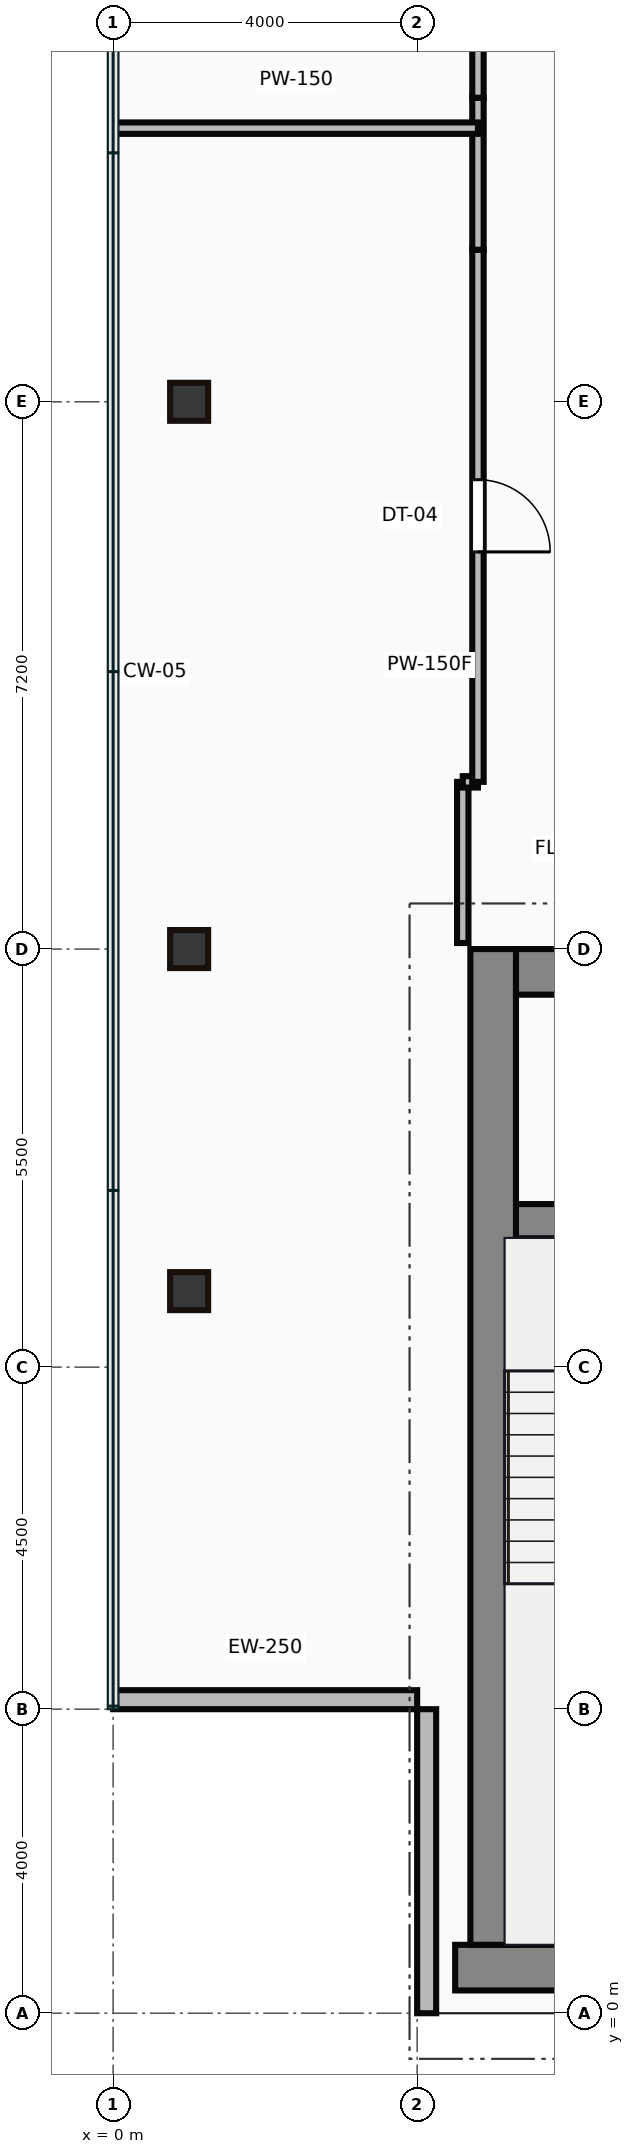
"""IFC4 building model, lengths in metres.
Left out: names, types, materials, properties, quantities, classifications, styles, units other than length and angle.
Written with IfcOpenShell. Run it as: python <this file> out.ifc"""

import sys

from ifc_helpers import new_model, si_unit, direction, frame, frame_2d, origin, origin_2d, place, context, subcontext, project, spatial, rectangle, hollow_rectangle, extrude, source, transform, mapped, element, fill, save


model = new_model("IFC4")
c1 = context("Model", 3, precision=1e-05, world=origin(), true_north=direction((0.0, 1.0)))
c2 = subcontext(c1, "Body", "Model", "MODEL_VIEW")
j1 = project(units=[si_unit("LENGTHUNIT", "METRE"), si_unit("PLANEANGLEUNIT", "RADIAN")], contexts=[c1])
p1 = place(None, origin())
s1 = spatial("IfcSite", under=j1, at=p1, CompositionType="ELEMENT")
p2 = place(p1, origin())
s2 = spatial("IfcBuilding", under=s1, at=p2, CompositionType="ELEMENT")
p3 = place(p2, frame((0.0, 0.0, 251.5)))
s3 = spatial("IfcBuildingStorey", under=s2, at=p3, CompositionType="ELEMENT", Elevation=251.5)
m1 = source(origin(), c2, "Body", "SweptSolid", [
    extrude(rectangle(XDim=29.5, YDim=0.6, at=frame_2d((14.75, 0.0))), origin(), (0.0, 0.0, 1.0), 3.65),
])
p4 = place(p3, frame((4.5, 0.6, 0.0), z_axis=(0.0, 0.0, 1.0), x_axis=(1.0, 0.0, 0.0)))
e1 = element("IfcWall", 1, at=p4, inside=s3, PredefinedType="SHEAR", context=c2, shape_type="MappedRepresentation", body=[
    mapped(m1, transform((0.0, 0.0, 0.0))),
])
m2 = source(origin(), c2, "Body", "SweptSolid", [
    extrude(rectangle(XDim=13.1, YDim=0.6, at=frame_2d((6.55, 0.0))), origin(), (0.0, 0.0, 1.0), 3.65),
])
p5 = place(p3, frame((5.0, 0.9, 0.0), z_axis=(0.0, 0.0, 1.0), x_axis=(0.0, 1.0, 0.0)))
e2 = element("IfcWall", 2, at=p5, inside=s3, PredefinedType="SHEAR", context=c2, shape_type="MappedRepresentation", body=[
    mapped(m2, transform((0.0, 0.0, 0.0))),
])
m3 = source(origin(), c2, "Body", "SweptSolid", [
    extrude(rectangle(XDim=9.1, YDim=0.6, at=frame_2d((4.55, 0.0))), origin(), (0.0, 0.0, 1.0), 3.65),
])
p6 = place(p3, frame((5.3, 13.7, 0.0), z_axis=(0.0, 0.0, 1.0), x_axis=(1.0, 0.0, 0.0)))
e3 = element("IfcWall", 3, at=p6, inside=s3, PredefinedType="SHEAR", context=c2, shape_type="MappedRepresentation", body=[
    mapped(m3, transform((0.0, 0.0, 0.0))),
])
p7 = place(p6, frame((4.1, 0.0, 0.0)))
e4 = element("IfcOpeningElement", 4, at=p7, cuts=e3, PredefinedType="OPENING", context=c2, shape_type="SweptSolid", body=[
    extrude(rectangle(XDim=1.1, YDim=2.15, at=frame_2d((0.55, 1.075))), frame((0.0, 0.31, 0.0), z_axis=(0.0, -1.0, 0.0), x_axis=(1.0, 0.0, 0.0)), (0.0, 0.0, 1.0), 0.62),
])
m4 = source(origin(), c2, "Body", "SweptSolid", [
    extrude(rectangle(XDim=3.39, YDim=0.45, at=frame_2d((1.695, 0.0))), origin(), (0.0, 0.0, 1.0), 3.65),
])
p8 = place(p3, frame((5.25, 10.42, 0.0), z_axis=(0.0, 0.0, 1.0), x_axis=(1.0, 0.0, 0.0)))
e5 = element("IfcWall", 5, at=p8, inside=s3, PredefinedType="SHEAR", context=c2, shape_type="MappedRepresentation", body=[
    mapped(m4, transform((0.0, 0.0, 0.0))),
])
p9 = place(p8, frame((1.05, 0.0, 0.0)))
e6 = element("IfcOpeningElement", 6, at=p9, cuts=e5, PredefinedType="OPENING", context=c2, shape_type="SweptSolid", body=[
    extrude(rectangle(XDim=1.1, YDim=2.15, at=frame_2d((0.55, 1.075))), frame((0.0, 0.235, 0.0), z_axis=(0.0, -1.0, 0.0), x_axis=(1.0, 0.0, 0.0)), (0.0, 0.0, 1.0), 0.47),
])
m5 = source(origin(), c2, "Body", "SweptSolid", [
    extrude(hollow_rectangle(XDim=0.5, YDim=0.5, WallThickness=0.022, at=origin_2d()), origin(), (0.0, 0.0, 1.0), 3.65),
])
for number, where, z_axis, x_axis in (
    (7, (1.0, 9.5, 0.0), (0.0, 0.0, 1.0), (1.0, 0.0, 0.0)),
    (8, (1.0, 14.0, 0.0), (0.0, 0.0, 1.0), (1.0, 0.0, 0.0)),
    (9, (1.0, 21.2, 0.0), (0.0, 0.0, 1.0), (1.0, 0.0, 0.0)),
):
    element("IfcColumn", number, at=place(p3, frame(where, z_axis=z_axis, x_axis=x_axis)), inside=s3, PredefinedType="COLUMN", context=c2, shape_type="MappedRepresentation", body=[
        mapped(m5, transform((0.0, 0.0, 0.0))),
    ])
m6 = source(origin(), c2, "Body", "SweptSolid", [
    extrude(rectangle(XDim=4.0, YDim=0.25, at=frame_2d((2.0, 0.0))), origin(), (0.0, 0.0, 1.0), 3.4),
])
for number, where, z_axis, x_axis in (
    (10, (0.0, 4.125, 0.0), (0.0, 0.0, 1.0), (1.0, 0.0, 0.0)),
    (11, (4.125, 4.0, 0.0), (0.0, 0.0, 1.0), (0.0, -1.0, 0.0)),
):
    element("IfcWall", number, at=place(p3, frame(where, z_axis=z_axis, x_axis=x_axis)), inside=s3, PredefinedType="STANDARD", context=c2, shape_type="MappedRepresentation", body=[
        mapped(m6, transform((0.0, 0.0, 0.0))),
    ])
m7 = source(origin(), c2, "Body", "SweptSolid", [
    extrude(rectangle(XDim=2.12, YDim=0.15, at=frame_2d((1.06, 0.0))), origin(), (0.0, 0.0, 1.0), 3.4),
])
p10 = place(p3, frame((4.6, 14.08, 0.0), z_axis=(0.0, 0.0, 1.0), x_axis=(0.0, 1.0, 0.0)))
e12 = element("IfcWall", 12, at=p10, inside=s3, PredefinedType="PARTITIONING", context=c2, shape_type="MappedRepresentation", body=[
    mapped(m7, transform((0.0, 0.0, 0.0))),
])
m8 = source(origin(), c2, "Body", "SweptSolid", [
    extrude(rectangle(XDim=0.2, YDim=0.15, at=frame_2d((0.1, 0.0))), origin(), (0.0, 0.0, 1.0), 3.4),
])
p11 = place(p3, frame((4.6, 16.2, 0.0), z_axis=(0.0, 0.0, 1.0), x_axis=(1.0, 0.0, 0.0)))
e13 = element("IfcWall", 13, at=p11, inside=s3, PredefinedType="PARTITIONING", context=c2, shape_type="MappedRepresentation", body=[
    mapped(m8, transform((0.0, 0.0, 0.0))),
])
m9 = source(origin(), c2, "Body", "SweptSolid", [
    extrude(rectangle(XDim=7.0, YDim=0.15, at=frame_2d((3.5, 0.0))), origin(), (0.0, 0.0, 1.0), 3.4),
])
p12 = place(p3, frame((4.8, 16.2, 0.0), z_axis=(0.0, 0.0, 1.0), x_axis=(0.0, 1.0, 0.0)))
e14 = element("IfcWall", 14, at=p12, inside=s3, PredefinedType="PARTITIONING", context=c2, shape_type="MappedRepresentation", body=[
    mapped(m9, transform((0.0, 0.0, 0.0))),
])
p13 = place(p12, frame((3.025, 0.0, 0.0)))
e15 = element("IfcOpeningElement", 15, at=p13, cuts=e14, PredefinedType="OPENING", context=c2, shape_type="SweptSolid", body=[
    extrude(rectangle(XDim=0.95, YDim=2.15, at=frame_2d((0.475, 1.075))), frame((0.0, 0.085, 0.0), z_axis=(0.0, -1.0, 0.0), x_axis=(1.0, 0.0, 0.0)), (0.0, 0.0, 1.0), 0.17),
])
m10 = source(origin(), c2, "Body", "SweptSolid", [
    extrude(rectangle(XDim=2.0, YDim=0.15, at=frame_2d((1.0, 0.0))), origin(), (0.0, 0.0, 1.0), 3.4),
])
p14 = place(p3, frame((4.8, 23.2, 0.0), z_axis=(0.0, 0.0, 1.0), x_axis=(0.0, 1.0, 0.0)))
e16 = element("IfcWall", 16, at=p14, inside=s3, PredefinedType="PARTITIONING", context=c2, shape_type="MappedRepresentation", body=[
    mapped(m10, transform((0.0, 0.0, 0.0))),
])
m11 = source(origin(), c2, "Body", "SweptSolid", [
    extrude(rectangle(XDim=7.6, YDim=0.15, at=frame_2d((3.8, 0.0))), origin(), (0.0, 0.0, 1.0), 3.4),
])
p15 = place(p3, frame((4.8, 25.2, 0.0), z_axis=(0.0, 0.0, 1.0), x_axis=(0.0, 1.0, 0.0)))
e17 = element("IfcWall", 17, at=p15, inside=s3, PredefinedType="PARTITIONING", context=c2, shape_type="MappedRepresentation", body=[
    mapped(m11, transform((0.0, 0.0, 0.0))),
])
p16 = place(p15, frame((3.325, 0.0, 0.0)))
e18 = element("IfcOpeningElement", 18, at=p16, cuts=e17, PredefinedType="OPENING", context=c2, shape_type="SweptSolid", body=[
    extrude(rectangle(XDim=0.95, YDim=2.15, at=frame_2d((0.475, 1.075))), frame((0.0, 0.085, 0.0), z_axis=(0.0, -1.0, 0.0), x_axis=(1.0, 0.0, 0.0)), (0.0, 0.0, 1.0), 0.17),
])
m12 = source(origin(), c2, "Body", "SweptSolid", [
    extrude(rectangle(XDim=4.78, YDim=0.15, at=frame_2d((2.39, 0.0))), origin(), (0.0, 0.0, 1.0), 3.4),
])
p17 = place(p3, frame((0.02, 24.8, 0.0), z_axis=(0.0, 0.0, 1.0), x_axis=(1.0, 0.0, 0.0)))
e19 = element("IfcWall", 19, at=p17, inside=s3, PredefinedType="PARTITIONING", context=c2, shape_type="MappedRepresentation", body=[
    mapped(m12, transform((0.0, 0.0, 0.0))),
])
m13 = source(origin(), c2, "Body", "SweptSolid", [
    extrude(rectangle(XDim=0.95, YDim=2.15, at=frame_2d((0.475, 1.075))), frame((0.0, 0.025, 0.0), z_axis=(0.0, -1.0, 0.0), x_axis=(1.0, 0.0, 0.0)), (0.0, 0.0, 1.0), 0.05),
])
p18 = place(p13, origin())
e20 = element("IfcDoor", 20, at=p18, inside=s3, OperationType="SINGLE_SWING_LEFT", PredefinedType="DOOR", context=c2, shape_type="MappedRepresentation", body=[
    mapped(m13, transform((0.0, 0.0, 0.0))),
])
fill(e15, e20)
save(model, sys.argv[1])
